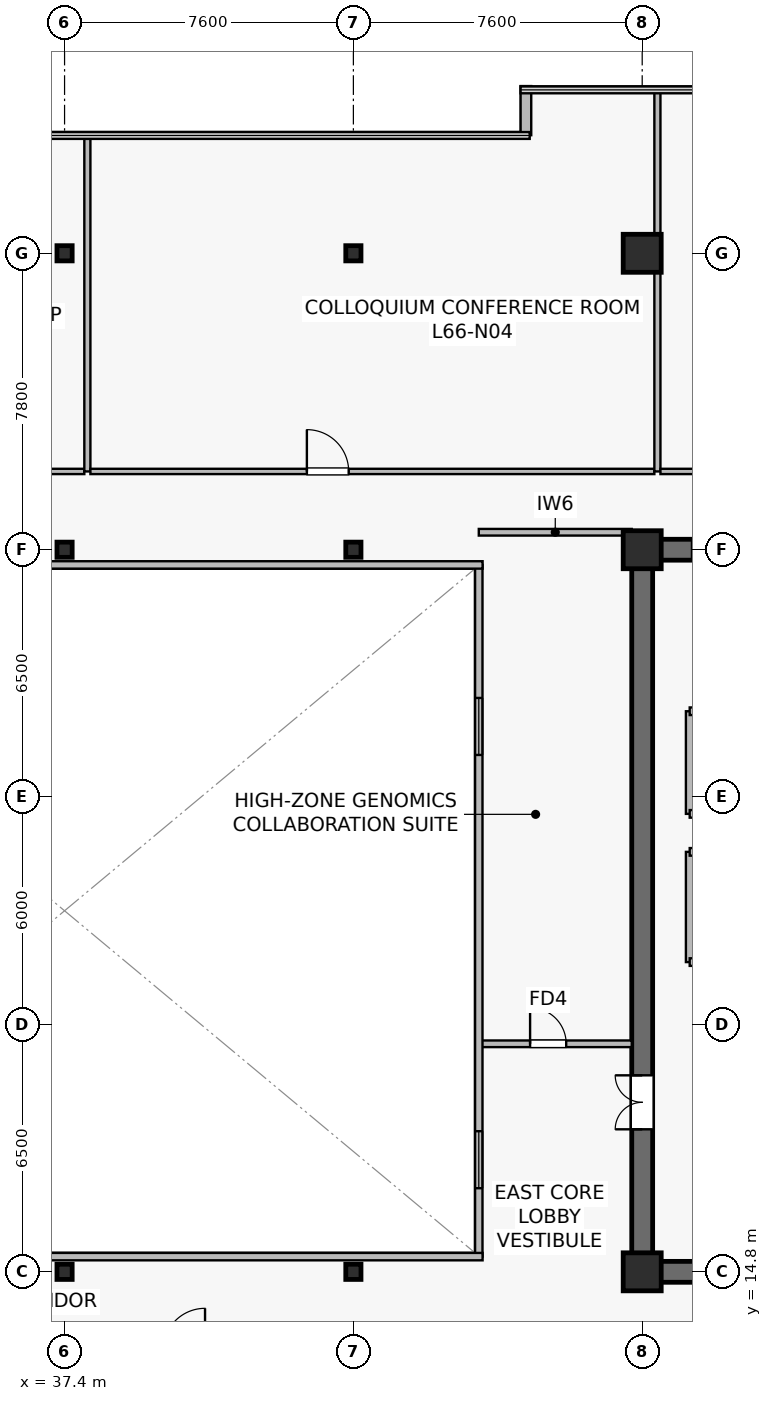
"""IFC4 building model, lengths in metres.
Left out: names, types, materials, properties, quantities, classifications, styles, units other than length and angle.
Written with IfcOpenShell. Run it as: python <this file> out.ifc"""

import sys

from ifc_helpers import new_model, si_unit, direction, frame, frame_2d, origin, origin_2d, place, context, subcontext, project, spatial, rectangle, hollow_rectangle, extrude, source, transform, mapped, element, fill, save


model = new_model("IFC4")
c1 = context("Model", 3, precision=1e-05, world=origin(), true_north=direction((0.0, 1.0)))
c2 = subcontext(c1, "Body", "Model", "MODEL_VIEW")
j1 = project(units=[si_unit("LENGTHUNIT", "METRE"), si_unit("PLANEANGLEUNIT", "RADIAN")], contexts=[c1])
p1 = place(None, origin())
s1 = spatial("IfcSite", under=j1, at=p1, CompositionType="ELEMENT")
p2 = place(p1, origin())
s2 = spatial("IfcBuilding", under=s1, at=p2, CompositionType="ELEMENT")
p3 = place(p2, frame((0.0, 0.0, 275.2)))
s3 = spatial("IfcBuildingStorey", under=s2, at=p3, CompositionType="ELEMENT", Elevation=275.2)
p4 = place(p3, frame((52.325, 14.8, 0.0), z_axis=(0.0, 0.0, 1.0), x_axis=(1.0, 0.0, 0.0)))
e1 = element("IfcWall", 1, at=p4, inside=s3, PredefinedType="SHEAR", context=c2, shape_type="SweptSolid", body=[
    extrude(rectangle(XDim=15.35, YDim=0.55, at=frame_2d((7.675, 0.0))), origin(), (0.0, 0.0, 1.0), 3.8),
])
p5 = place(p3, frame((52.325, 33.8, 0.0), z_axis=(0.0, 0.0, 1.0), x_axis=(1.0, 0.0, 0.0)))
e2 = element("IfcWall", 2, at=p5, inside=s3, PredefinedType="SHEAR", context=c2, shape_type="SweptSolid", body=[
    extrude(rectangle(XDim=15.35, YDim=0.55, at=frame_2d((7.675, 0.0))), origin(), (0.0, 0.0, 1.0), 3.8),
])
p6 = place(p5, frame((9.2, 0.0, 0.0)))
e3 = element("IfcOpeningElement", 3, at=p6, cuts=e2, PredefinedType="OPENING", context=c2, shape_type="SweptSolid", body=[
    extrude(rectangle(XDim=0.95, YDim=2.15, at=frame_2d((0.475, 1.075))), frame((0.0, 0.285, 0.0), z_axis=(0.0, -1.0, 0.0), x_axis=(1.0, 0.0, 0.0)), (0.0, 0.0, 1.0), 0.57),
])
p7 = place(p5, frame((6.685, 0.0, 0.0)))
e4 = element("IfcOpeningElement", 4, at=p7, cuts=e2, PredefinedType="OPENING", context=c2, shape_type="SweptSolid", body=[
    extrude(rectangle(XDim=0.95, YDim=2.15, at=frame_2d((0.475, 1.075))), frame((0.0, 0.285, 0.0), z_axis=(0.0, -1.0, 0.0), x_axis=(1.0, 0.0, 0.0)), (0.0, 0.0, 1.0), 0.57),
])
p8 = place(p5, frame((4.135, 0.0, 0.0)))
e5 = element("IfcOpeningElement", 5, at=p8, cuts=e2, PredefinedType="OPENING", context=c2, shape_type="SweptSolid", body=[
    extrude(rectangle(XDim=0.95, YDim=2.15, at=frame_2d((0.475, 1.075))), frame((0.0, 0.285, 0.0), z_axis=(0.0, -1.0, 0.0), x_axis=(1.0, 0.0, 0.0)), (0.0, 0.0, 1.0), 0.57),
])
p9 = place(p5, frame((1.585, 0.0, 0.0)))
e6 = element("IfcOpeningElement", 6, at=p9, cuts=e2, PredefinedType="OPENING", context=c2, shape_type="SweptSolid", body=[
    extrude(rectangle(XDim=0.95, YDim=2.15, at=frame_2d((0.475, 1.075))), frame((0.0, 0.285, 0.0), z_axis=(0.0, -1.0, 0.0), x_axis=(1.0, 0.0, 0.0)), (0.0, 0.0, 1.0), 0.57),
])
p10 = place(p3, frame((52.6, 15.075, 0.0), z_axis=(0.0, 0.0, 1.0), x_axis=(0.0, 1.0, 0.0)))
e7 = element("IfcWall", 7, at=p10, inside=s3, PredefinedType="SHEAR", context=c2, shape_type="SweptSolid", body=[
    extrude(rectangle(XDim=18.45, YDim=0.55, at=frame_2d((9.225, 0.0))), origin(), (0.0, 0.0, 1.0), 3.8),
])
p11 = place(p10, frame((3.475, 0.0, 0.0)))
e8 = element("IfcOpeningElement", 8, at=p11, cuts=e7, PredefinedType="OPENING", context=c2, shape_type="SweptSolid", body=[
    extrude(rectangle(XDim=1.42, YDim=2.2, at=frame_2d((0.71, 1.1))), frame((0.0, 0.285, 0.0), z_axis=(0.0, -1.0, 0.0), x_axis=(1.0, 0.0, 0.0)), (0.0, 0.0, 1.0), 0.57),
])
m1 = source(origin(), c2, "Body", "SweptSolid", [
    extrude(rectangle(XDim=1.0, YDim=1.0, at=origin_2d()), origin(), (0.0, 0.0, 1.0), 4.1),
])
for number, where, z_axis, x_axis in (
    (9, (52.6, 14.8, 0.0), (0.0, 0.0, 1.0), (1.0, 0.0, 0.0)),
    (10, (52.6, 33.8, 0.0), (0.0, 0.0, 1.0), (1.0, 0.0, 0.0)),
    (11, (52.6, 41.6, 0.0), (0.0, 0.0, 1.0), (1.0, 0.0, 0.0)),
):
    element("IfcColumn", number, at=place(p3, frame(where, z_axis=z_axis, x_axis=x_axis)), inside=s3, PredefinedType="COLUMN", context=c2, shape_type="MappedRepresentation", body=[
        mapped(m1, transform((0.0, 0.0, 0.0), scale=1.0)),
    ])
m2 = source(origin(), c2, "Body", "SweptSolid", [
    extrude(hollow_rectangle(XDim=0.4, YDim=0.4, WallThickness=0.019, at=origin_2d()), origin(), (0.0, 0.0, 1.0), 4.1),
])
for number, where, z_axis, x_axis in (
    (12, (37.4, 14.8, 0.0), (0.0, 0.0, 1.0), (1.0, 0.0, 0.0)),
    (13, (37.4, 33.8, 0.0), (0.0, 0.0, 1.0), (1.0, 0.0, 0.0)),
    (14, (37.4, 41.6, 0.0), (0.0, 0.0, 1.0), (1.0, 0.0, 0.0)),
    (15, (45.0, 14.8, 0.0), (0.0, 0.0, 1.0), (1.0, 0.0, 0.0)),
    (16, (45.0, 33.8, 0.0), (0.0, 0.0, 1.0), (1.0, 0.0, 0.0)),
    (17, (45.0, 41.6, 0.0), (0.0, 0.0, 1.0), (1.0, 0.0, 0.0)),
):
    element("IfcColumn", number, at=place(p3, frame(where, z_axis=z_axis, x_axis=x_axis)), inside=s3, PredefinedType="COLUMN", context=c2, shape_type="MappedRepresentation", body=[
        mapped(m2, transform((0.0, 0.0, 0.0), scale=1.0)),
    ])
p12 = place(p3, frame((49.54, 46.0, 0.0), z_axis=(0.0, 0.0, 1.0), x_axis=(0.0, -1.0, 0.0)))
e18 = element("IfcWall", 18, at=p12, inside=s3, PredefinedType="STANDARD", context=c2, shape_type="SweptSolid", body=[
    extrude(rectangle(XDim=1.293, YDim=0.28, at=frame_2d((0.646, 0.0))), origin(), (0.0, 0.0, 1.0), 3.8),
])
p13 = place(p3, frame((53.85, 26.85, 0.0), z_axis=(0.0, 0.0, 1.0), x_axis=(0.0, 1.0, 0.0)))
e19 = element("IfcWall", 19, at=p13, inside=s3, PredefinedType="SOLIDWALL", context=c2, shape_type="SweptSolid", body=[
    extrude(rectangle(XDim=2.7, YDim=0.2, at=frame_2d((1.35, 0.0))), origin(), (0.0, 0.0, 1.0), 3.8),
])
p14 = place(p3, frame((53.85, 29.55, 0.0), z_axis=(0.0, 0.0, 1.0), x_axis=(1.0, 0.0, 0.0)))
e20 = element("IfcWall", 20, at=p14, inside=s3, PredefinedType="SOLIDWALL", context=c2, shape_type="SweptSolid", body=[
    extrude(rectangle(XDim=2.19, YDim=0.2, at=frame_2d((1.095, 0.0))), origin(), (0.0, 0.0, 1.0), 3.8),
])
p15 = place(p3, frame((53.85, 26.85, 0.0), z_axis=(0.0, 0.0, 1.0), x_axis=(1.0, 0.0, 0.0)))
e21 = element("IfcWall", 21, at=p15, inside=s3, PredefinedType="SOLIDWALL", context=c2, shape_type="SweptSolid", body=[
    extrude(rectangle(XDim=2.19, YDim=0.2, at=frame_2d((1.095, 0.0))), origin(), (0.0, 0.0, 1.0), 3.197),
])
p16 = place(p3, frame((53.85, 22.95, 0.0), z_axis=(0.0, 0.0, 1.0), x_axis=(0.0, 1.0, 0.0)))
e22 = element("IfcWall", 22, at=p16, inside=s3, PredefinedType="SOLIDWALL", context=c2, shape_type="SweptSolid", body=[
    extrude(rectangle(XDim=2.9, YDim=0.2, at=frame_2d((1.45, 0.0))), origin(), (0.0, 0.0, 1.0), 2.935),
])
for number, where, z_axis, x_axis in (
    (23, (53.85, 25.85, 0.0), (0.0, 0.0, 1.0), (1.0, 0.0, 0.0)),
    (24, (53.85, 22.95, 0.0), (0.0, 0.0, 1.0), (1.0, 0.0, 0.0)),
):
    element("IfcWall", number, at=place(p3, frame(where, z_axis=z_axis, x_axis=x_axis)), inside=s3, PredefinedType="SOLIDWALL", context=c2, shape_type="SweptSolid", body=[
        extrude(rectangle(XDim=2.19, YDim=0.2, at=frame_2d((1.095, 0.0))), origin(), (0.0, 0.0, 1.0), 3.8),
    ])
p17 = place(p3, frame((48.3, 34.26, 0.0), z_axis=(0.0, 0.0, 1.0), x_axis=(1.0, 0.0, 0.0)))
e25 = element("IfcWall", 25, at=p17, inside=s3, PredefinedType="PARTITIONING", context=c2, shape_type="SweptSolid", body=[
    extrude(rectangle(XDim=4.025, YDim=0.175, at=frame_2d((2.012, 0.0))), origin(), (0.0, 0.0, 1.0), 3.535),
])
p18 = place(p3, frame((48.3, 20.8, 0.0), z_axis=(0.0, 0.0, 1.0), x_axis=(1.0, 0.0, 0.0)))
e26 = element("IfcWall", 26, at=p18, inside=s3, PredefinedType="PARTITIONING", context=c2, shape_type="SweptSolid", body=[
    extrude(rectangle(XDim=4.025, YDim=0.175, at=frame_2d((2.012, 0.0))), origin(), (0.0, 0.0, 1.0), 3.8),
])
p19 = place(p18, frame((1.35, 0.0, 0.0)))
e27 = element("IfcOpeningElement", 27, at=p19, cuts=e26, PredefinedType="OPENING", context=c2, shape_type="SweptSolid", body=[
    extrude(rectangle(XDim=0.95, YDim=2.15, at=frame_2d((0.475, 1.075))), frame((0.0, 0.098, 0.0), z_axis=(0.0, -1.0, 0.0), x_axis=(1.0, 0.0, 0.0)), (0.0, 0.0, 1.0), 0.195),
])
p20 = place(p3, frame((48.3, 15.2, 0.0), z_axis=(0.0, 0.0, 1.0), x_axis=(0.0, 1.0, 0.0)))
e28 = element("IfcWall", 28, at=p20, inside=s3, PredefinedType="SOLIDWALL", context=c2, shape_type="SweptSolid", body=[
    extrude(rectangle(XDim=18.2, YDim=0.195, at=frame_2d((9.1, 0.0))), origin(), (0.0, 0.0, 1.0), 3.8),
])
p21 = place(p20, frame((1.8, 0.0, 0.9)))
e29 = element("IfcOpeningElement", 29, at=p21, cuts=e28, PredefinedType="OPENING", context=c2, shape_type="SweptSolid", body=[
    extrude(rectangle(XDim=1.5, YDim=1.4, at=frame_2d((0.75, 0.7))), frame((0.0, 0.107, 0.0), z_axis=(0.0, -1.0, 0.0), x_axis=(1.0, 0.0, 0.0)), (0.0, 0.0, 1.0), 0.215),
])
p22 = place(p20, frame((13.2, 0.0, 0.9)))
e30 = element("IfcOpeningElement", 30, at=p22, cuts=e28, PredefinedType="OPENING", context=c2, shape_type="SweptSolid", body=[
    extrude(rectangle(XDim=1.5, YDim=1.4, at=frame_2d((0.75, 0.7))), frame((0.0, 0.107, 0.0), z_axis=(0.0, -1.0, 0.0), x_axis=(1.0, 0.0, 0.0)), (0.0, 0.0, 1.0), 0.215),
])
for number, where, z_axis, x_axis in (
    (31, (26.4, 15.2, 0.0), (0.0, 0.0, 1.0), (1.0, 0.0, 0.0)),
    (32, (26.4, 33.4, 0.0), (0.0, 0.0, 1.0), (1.0, 0.0, 0.0)),
):
    element("IfcWall", number, at=place(p3, frame(where, z_axis=z_axis, x_axis=x_axis)), inside=s3, PredefinedType="SOLIDWALL", context=c2, shape_type="SweptSolid", body=[
        extrude(rectangle(XDim=22.0, YDim=0.195, at=frame_2d((11.0, 0.0))), origin(), (0.0, 0.0, 1.0), 3.8),
    ])
p23 = place(p3, frame((24.48, 35.86, 0.0), z_axis=(0.0, 0.0, 1.0), x_axis=(1.0, 0.0, 0.0)))
e33 = element("IfcWall", 33, at=p23, inside=s3, PredefinedType="PARTITIONING", context=c2, shape_type="SweptSolid", body=[
    extrude(rectangle(XDim=13.44, YDim=0.14, at=frame_2d((6.72, 0.0))), origin(), (0.0, 0.0, 1.0), 3.197),
])
p24 = place(p23, frame((6.519, 0.0, 0.0)))
e34 = element("IfcOpeningElement", 34, at=p24, cuts=e33, PredefinedType="OPENING", context=c2, shape_type="SweptSolid", body=[
    extrude(rectangle(XDim=1.1, YDim=2.18, at=frame_2d((0.55, 1.09))), frame((0.0, 0.08, 0.0), z_axis=(0.0, -1.0, 0.0), x_axis=(1.0, 0.0, 0.0)), (0.0, 0.0, 1.0), 0.16),
])
p25 = place(p3, frame((38.0, 35.86, 0.0), z_axis=(0.0, 0.0, 1.0), x_axis=(0.0, 1.0, 0.0)))
e35 = element("IfcWall", 35, at=p25, inside=s3, PredefinedType="PARTITIONING", context=c2, shape_type="SweptSolid", body=[
    extrude(rectangle(XDim=8.83, YDim=0.16, at=frame_2d((4.415, 0.0))), origin(), (0.0, 0.0, 1.0), 3.135),
])
p26 = place(p3, frame((38.08, 35.86, 0.0), z_axis=(0.0, 0.0, 1.0), x_axis=(1.0, 0.0, 0.0)))
e36 = element("IfcWall", 36, at=p26, inside=s3, PredefinedType="PARTITIONING", context=c2, shape_type="SweptSolid", body=[
    extrude(rectangle(XDim=14.84, YDim=0.14, at=frame_2d((7.42, 0.0))), origin(), (0.0, 0.0, 1.0), 3.197),
])
p27 = place(p26, frame((5.696, 0.0, 0.0)))
e37 = element("IfcOpeningElement", 37, at=p27, cuts=e36, PredefinedType="OPENING", context=c2, shape_type="SweptSolid", body=[
    extrude(rectangle(XDim=1.1, YDim=2.18, at=frame_2d((0.55, 1.09))), frame((0.0, 0.08, 0.0), z_axis=(0.0, -1.0, 0.0), x_axis=(1.0, 0.0, 0.0)), (0.0, 0.0, 1.0), 0.16),
])
p28 = place(p3, frame((53.0, 35.86, 0.0), z_axis=(0.0, 0.0, 1.0), x_axis=(0.0, 1.0, 0.0)))
e38 = element("IfcWall", 38, at=p28, inside=s3, PredefinedType="PARTITIONING", context=c2, shape_type="SweptSolid", body=[
    extrude(rectangle(XDim=10.03, YDim=0.16, at=frame_2d((5.015, 0.0))), origin(), (0.0, 0.0, 1.0), 3.135),
])
p29 = place(p3, frame((53.08, 35.86, 0.0), z_axis=(0.0, 0.0, 1.0), x_axis=(1.0, 0.0, 0.0)))
e39 = element("IfcWall", 39, at=p29, inside=s3, PredefinedType="PARTITIONING", context=c2, shape_type="SweptSolid", body=[
    extrude(rectangle(XDim=14.41, YDim=0.14, at=frame_2d((7.205, 0.0))), origin(), (0.0, 0.0, 1.0), 3.197),
])
p30 = place(p29, frame((7.033, 0.0, 0.0)))
e40 = element("IfcOpeningElement", 40, at=p30, cuts=e39, PredefinedType="OPENING", context=c2, shape_type="SweptSolid", body=[
    extrude(rectangle(XDim=1.1, YDim=2.18, at=frame_2d((0.55, 1.09))), frame((0.0, 0.08, 0.0), z_axis=(0.0, -1.0, 0.0), x_axis=(1.0, 0.0, 0.0)), (0.0, 0.0, 1.0), 0.16),
])
m3 = source(origin(), c2, "Body", "SweptSolid", [
    extrude(rectangle(XDim=1.5, YDim=1.4, at=frame_2d((0.75, 0.7))), frame((0.0, 0.03, 0.0), z_axis=(0.0, -1.0, 0.0), x_axis=(1.0, 0.0, 0.0)), (0.0, 0.0, 1.0), 0.06),
])
p31 = place(p21, origin())
e41 = element("IfcWindow", 41, at=p31, inside=s3, PartitioningType="SINGLE_PANEL", PredefinedType="WINDOW", context=c2, shape_type="MappedRepresentation", body=[
    mapped(m3, transform((0.0, 0.0, 0.0), scale=1.0)),
])
fill(e29, e41)
p32 = place(p22, origin())
e42 = element("IfcWindow", 42, at=p32, inside=s3, PartitioningType="SINGLE_PANEL", PredefinedType="WINDOW", context=c2, shape_type="MappedRepresentation", body=[
    mapped(m3, transform((0.0, 0.0, 0.0), scale=1.0)),
])
fill(e30, e42)
m4 = source(origin(), c2, "Body", "SweptSolid", [
    extrude(rectangle(XDim=1.42, YDim=2.2, at=frame_2d((0.71, 1.1))), frame((0.0, 0.025, 0.0), z_axis=(0.0, -1.0, 0.0), x_axis=(1.0, 0.0, 0.0)), (0.0, 0.0, 1.0), 0.05),
])
p33 = place(p11, origin())
e43 = element("IfcDoor", 43, at=p33, inside=s3, OperationType="DOUBLE_DOOR_SINGLE_SWING", PredefinedType="DOOR", context=c2, shape_type="MappedRepresentation", body=[
    mapped(m4, transform((0.0, 0.0, 0.0), scale=1.0)),
])
fill(e8, e43)
m5 = source(origin(), c2, "Body", "SweptSolid", [
    extrude(rectangle(XDim=0.95, YDim=2.15, at=frame_2d((0.475, 1.075))), frame((0.0, 0.025, 0.0), z_axis=(0.0, -1.0, 0.0), x_axis=(1.0, 0.0, 0.0)), (0.0, 0.0, 1.0), 0.05),
])
p34 = place(p9, origin())
e44 = element("IfcDoor", 44, at=p34, inside=s3, OperationType="SINGLE_SWING_RIGHT", PredefinedType="DOOR", context=c2, shape_type="MappedRepresentation", body=[
    mapped(m5, transform((0.0, 0.0, 0.0), scale=1.0)),
])
fill(e6, e44)
p35 = place(p19, origin())
e45 = element("IfcDoor", 45, at=p35, inside=s3, OperationType="SINGLE_SWING_LEFT", PredefinedType="DOOR", context=c2, shape_type="MappedRepresentation", body=[
    mapped(m5, transform((0.0, 0.0, 0.0), scale=1.0)),
])
fill(e27, e45)
m6 = source(origin(), c2, "Body", "SweptSolid", [
    extrude(rectangle(XDim=1.1, YDim=2.18, at=frame_2d((0.55, 1.09))), frame((0.0, 0.025, 0.0), z_axis=(0.0, -1.0, 0.0), x_axis=(1.0, 0.0, 0.0)), (0.0, 0.0, 1.0), 0.05),
])
p36 = place(p27, origin())
e46 = element("IfcDoor", 46, at=p36, inside=s3, OperationType="SINGLE_SWING_LEFT", PredefinedType="DOOR", context=c2, shape_type="MappedRepresentation", body=[
    mapped(m6, transform((0.0, 0.0, 0.0), scale=1.0)),
])
fill(e37, e46)
save(model, sys.argv[1])
